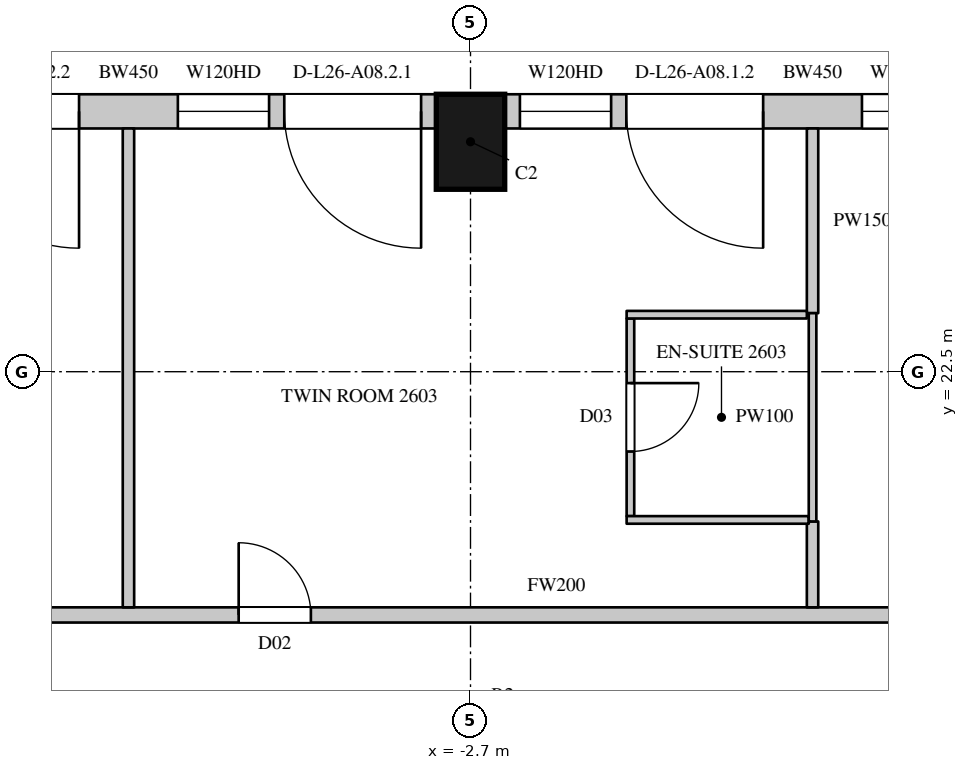
"""IFC4 building model, lengths in metres.
Left out: names, types, materials, properties, quantities, classifications, styles, units other than length and angle.
Written with IfcOpenShell. Run it as: python <this file> out.ifc"""

import sys

from ifc_helpers import new_model, si_unit, direction, frame, frame_2d, origin, origin_2d, place, context, subcontext, project, spatial, rectangle, extrude, element, fill, save


model = new_model("IFC4")
c1 = context("Model", 3, precision=1e-05, world=origin(), true_north=direction((0.0, 1.0)))
c2 = subcontext(c1, "Body", "Model", "MODEL_VIEW")
j1 = project(units=[si_unit("LENGTHUNIT", "METRE"), si_unit("PLANEANGLEUNIT", "RADIAN")], contexts=[c1])
p1 = place(None, origin())
s1 = spatial("IfcSite", under=j1, at=p1, CompositionType="ELEMENT")
p2 = place(p1, origin())
s2 = spatial("IfcBuilding", under=s1, at=p2, CompositionType="ELEMENT")
p3 = place(p2, frame((0.0, 0.0, 123.9)))
s3 = spatial("IfcBuildingStorey", under=s2, at=p3, CompositionType="ELEMENT", Elevation=123.9)
p4 = place(p3, frame((-2.7, 25.525, 0.0), z_axis=(0.0, 0.0, 1.0), x_axis=(-1.0, 0.0, 0.0)))
e1 = element("IfcColumn", 1, at=p4, inside=s3, PredefinedType="COLUMN", context=c2, shape_type="SweptSolid", body=[
    extrude(rectangle(XDim=0.9, YDim=1.25, at=origin_2d()), origin(), (0.0, 0.0, 1.0), 3.6),
])
p5 = place(p3, frame((5.85, 25.925, 0.0), z_axis=(0.0, 0.0, 1.0), x_axis=(-1.0, 0.0, 0.0)))
e2 = element("IfcWall", 2, at=p5, inside=s3, PredefinedType="SOLIDWALL", context=c2, shape_type="SweptSolid", body=[
    extrude(rectangle(XDim=8.1, YDim=0.45, at=frame_2d((4.05, 0.0))), origin(), (0.0, 0.0, 1.0), 3.3),
])
p6 = place(p5, frame((0.2, 0.0, 0.0)))
e3 = element("IfcOpeningElement", 3, at=p6, cuts=e2, PredefinedType="OPENING", context=c2, shape_type="SweptSolid", body=[
    extrude(rectangle(XDim=1.8, YDim=2.4, at=frame_2d((0.9, 1.2))), frame((0.0, 0.235, 0.0), z_axis=(0.0, -1.0, 0.0), x_axis=(1.0, 0.0, 0.0)), (0.0, 0.0, 1.0), 0.47),
])
p7 = place(p5, frame((2.2, 0.0, 1.05)))
e4 = element("IfcOpeningElement", 4, at=p7, cuts=e2, PredefinedType="OPENING", context=c2, shape_type="SweptSolid", body=[
    extrude(rectangle(XDim=1.2, YDim=2.0, at=frame_2d((0.6, 1.0))), frame((0.0, 0.235, 0.0), z_axis=(0.0, -1.0, 0.0), x_axis=(1.0, 0.0, 0.0)), (0.0, 0.0, 1.0), 0.47),
])
p8 = place(p5, frame((4.7, 0.0, 0.0)))
e5 = element("IfcOpeningElement", 5, at=p8, cuts=e2, PredefinedType="OPENING", context=c2, shape_type="SweptSolid", body=[
    extrude(rectangle(XDim=1.8, YDim=2.4, at=frame_2d((0.9, 1.2))), frame((0.0, 0.235, 0.0), z_axis=(0.0, -1.0, 0.0), x_axis=(1.0, 0.0, 0.0)), (0.0, 0.0, 1.0), 0.47),
])
p9 = place(p5, frame((6.7, 0.0, 1.05)))
e6 = element("IfcOpeningElement", 6, at=p9, cuts=e2, PredefinedType="OPENING", context=c2, shape_type="SweptSolid", body=[
    extrude(rectangle(XDim=1.2, YDim=2.0, at=frame_2d((0.6, 1.0))), frame((0.0, 0.235, 0.0), z_axis=(0.0, -1.0, 0.0), x_axis=(1.0, 0.0, 0.0)), (0.0, 0.0, 1.0), 0.47),
])
p10 = place(p3, frame((-3.15, 25.925, 0.0), z_axis=(0.0, 0.0, 1.0), x_axis=(-1.0, 0.0, 0.0)))
e7 = element("IfcWall", 7, at=p10, inside=s3, PredefinedType="SOLIDWALL", context=c2, shape_type="SweptSolid", body=[
    extrude(rectangle(XDim=8.1, YDim=0.45, at=frame_2d((4.05, 0.0))), origin(), (0.0, 0.0, 1.0), 3.3),
])
p11 = place(p10, frame((0.2, 0.0, 0.0)))
e8 = element("IfcOpeningElement", 8, at=p11, cuts=e7, PredefinedType="OPENING", context=c2, shape_type="SweptSolid", body=[
    extrude(rectangle(XDim=1.8, YDim=2.4, at=frame_2d((0.9, 1.2))), frame((0.0, 0.235, 0.0), z_axis=(0.0, -1.0, 0.0), x_axis=(1.0, 0.0, 0.0)), (0.0, 0.0, 1.0), 0.47),
])
p12 = place(p10, frame((2.2, 0.0, 1.05)))
e9 = element("IfcOpeningElement", 9, at=p12, cuts=e7, PredefinedType="OPENING", context=c2, shape_type="SweptSolid", body=[
    extrude(rectangle(XDim=1.2, YDim=2.0, at=frame_2d((0.6, 1.0))), frame((0.0, 0.235, 0.0), z_axis=(0.0, -1.0, 0.0), x_axis=(1.0, 0.0, 0.0)), (0.0, 0.0, 1.0), 0.47),
])
p13 = place(p10, frame((4.7, 0.0, 0.0)))
e10 = element("IfcOpeningElement", 10, at=p13, cuts=e7, PredefinedType="OPENING", context=c2, shape_type="SweptSolid", body=[
    extrude(rectangle(XDim=1.8, YDim=2.4, at=frame_2d((0.9, 1.2))), frame((0.0, 0.235, 0.0), z_axis=(0.0, -1.0, 0.0), x_axis=(1.0, 0.0, 0.0)), (0.0, 0.0, 1.0), 0.47),
])
p14 = place(p10, frame((6.7, 0.0, 1.05)))
e11 = element("IfcOpeningElement", 11, at=p14, cuts=e7, PredefinedType="OPENING", context=c2, shape_type="SweptSolid", body=[
    extrude(rectangle(XDim=1.2, YDim=2.0, at=frame_2d((0.6, 1.0))), frame((0.0, 0.235, 0.0), z_axis=(0.0, -1.0, 0.0), x_axis=(1.0, 0.0, 0.0)), (0.0, 0.0, 1.0), 0.47),
])
p15 = place(p3, frame((-20.8, 19.3, 0.0), z_axis=(0.0, 0.0, 1.0), x_axis=(1.0, 0.0, 0.0)))
e12 = element("IfcWall", 12, at=p15, inside=s3, PredefinedType="PARTITIONING", context=c2, shape_type="SweptSolid", body=[
    extrude(rectangle(XDim=38.464, YDim=0.2, at=frame_2d((19.232, 0.0))), origin(), (0.0, 0.0, 1.0), 3.3),
])
p16 = place(p15, frame((24.05, 0.0, 0.0)))
e13 = element("IfcOpeningElement", 13, at=p16, cuts=e12, PredefinedType="OPENING", context=c2, shape_type="SweptSolid", body=[
    extrude(rectangle(XDim=0.9, YDim=2.2, at=frame_2d((0.45, 1.1))), frame((0.0, 0.11, 0.0), z_axis=(0.0, -1.0, 0.0), x_axis=(1.0, 0.0, 0.0)), (0.0, 0.0, 1.0), 0.22),
])
p17 = place(p15, frame((11.2, 0.0, 0.0)))
e14 = element("IfcOpeningElement", 14, at=p17, cuts=e12, PredefinedType="OPENING", context=c2, shape_type="SweptSolid", body=[
    extrude(rectangle(XDim=0.95, YDim=2.2, at=frame_2d((0.475, 1.1))), frame((0.0, 0.11, 0.0), z_axis=(0.0, -1.0, 0.0), x_axis=(1.0, 0.0, 0.0)), (0.0, 0.0, 1.0), 0.22),
])
p18 = place(p15, frame((15.05, 0.0, 0.0)))
e15 = element("IfcOpeningElement", 15, at=p18, cuts=e12, PredefinedType="OPENING", context=c2, shape_type="SweptSolid", body=[
    extrude(rectangle(XDim=0.95, YDim=2.2, at=frame_2d((0.475, 1.1))), frame((0.0, 0.11, 0.0), z_axis=(0.0, -1.0, 0.0), x_axis=(1.0, 0.0, 0.0)), (0.0, 0.0, 1.0), 0.22),
])
p19 = place(p15, frame((32.0, 0.0, 0.0)))
e16 = element("IfcOpeningElement", 16, at=p19, cuts=e12, PredefinedType="OPENING", context=c2, shape_type="SweptSolid", body=[
    extrude(rectangle(XDim=0.95, YDim=2.2, at=frame_2d((0.475, 1.1))), frame((0.0, 0.11, 0.0), z_axis=(0.0, -1.0, 0.0), x_axis=(1.0, 0.0, 0.0)), (0.0, 0.0, 1.0), 0.22),
])
p20 = place(p3, frame((-7.2, 19.4, 0.0), z_axis=(0.0, 0.0, 1.0), x_axis=(0.0, 1.0, 0.0)))
e17 = element("IfcWall", 17, at=p20, inside=s3, PredefinedType="PARTITIONING", context=c2, shape_type="SweptSolid", body=[
    extrude(rectangle(XDim=6.3, YDim=0.15, at=frame_2d((3.15, 0.0))), origin(), (0.0, 0.0, 1.0), 2.65),
])
p21 = place(p3, frame((1.8, 19.4, 0.0), z_axis=(0.0, 0.0, 1.0), x_axis=(0.0, 1.0, 0.0)))
e18 = element("IfcWall", 18, at=p21, inside=s3, PredefinedType="PARTITIONING", context=c2, shape_type="SweptSolid", body=[
    extrude(rectangle(XDim=1.13, YDim=0.15, at=frame_2d((0.565, 0.0))), origin(), (0.0, 0.0, 1.0), 2.65),
])
p22 = place(p3, frame((1.8, 23.27, 0.0), z_axis=(0.0, 0.0, 1.0), x_axis=(0.0, 1.0, 0.0)))
e19 = element("IfcWall", 19, at=p22, inside=s3, PredefinedType="PARTITIONING", context=c2, shape_type="SweptSolid", body=[
    extrude(rectangle(XDim=2.43, YDim=0.15, at=frame_2d((1.215, 0.0))), origin(), (0.0, 0.0, 1.0), 2.65),
])
p23 = place(p3, frame((-0.596, 20.6, 0.0), z_axis=(0.0, 0.0, 1.0), x_axis=(0.0, 1.0, 0.0)))
e20 = element("IfcWall", 20, at=p23, inside=s3, PredefinedType="PARTITIONING", context=c2, shape_type="SweptSolid", body=[
    extrude(rectangle(XDim=2.6, YDim=0.1, at=frame_2d((1.3, 0.0))), origin(), (0.0, 0.0, 1.0), 3.3),
])
p24 = place(p23, frame((0.85, 0.0, 0.0)))
e21 = element("IfcOpeningElement", 21, at=p24, cuts=e20, PredefinedType="OPENING", context=c2, shape_type="SweptSolid", body=[
    extrude(rectangle(XDim=0.9, YDim=2.2, at=frame_2d((0.45, 1.1))), frame((0.0, 0.06, 0.0), z_axis=(0.0, -1.0, 0.0), x_axis=(1.0, 0.0, 0.0)), (0.0, 0.0, 1.0), 0.12),
])
p25 = place(p3, frame((-0.646, 20.55, 0.0), z_axis=(0.0, 0.0, 1.0), x_axis=(1.0, 0.0, 0.0)))
e22 = element("IfcWall", 22, at=p25, inside=s3, PredefinedType="PARTITIONING", context=c2, shape_type="SweptSolid", body=[
    extrude(rectangle(XDim=2.396, YDim=0.1, at=frame_2d((1.198, 0.0))), origin(), (0.0, 0.0, 1.0), 3.3),
])
p26 = place(p3, frame((-0.646, 23.25, 0.0), z_axis=(0.0, 0.0, 1.0), x_axis=(1.0, 0.0, 0.0)))
e23 = element("IfcWall", 23, at=p26, inside=s3, PredefinedType="PARTITIONING", context=c2, shape_type="SweptSolid", body=[
    extrude(rectangle(XDim=2.371, YDim=0.1, at=frame_2d((1.186, 0.0))), origin(), (0.0, 0.0, 1.0), 3.3),
])
p27 = place(p3, frame((1.8, 20.53, 0.0), z_axis=(0.0, 0.0, 1.0), x_axis=(0.0, 1.0, 0.0)))
e24 = element("IfcWall", 24, at=p27, inside=s3, PredefinedType="PARTITIONING", context=c2, shape_type="SweptSolid", body=[
    extrude(rectangle(XDim=2.74, YDim=0.1, at=frame_2d((1.37, 0.0))), origin(), (0.0, 0.0, 1.0), 2.65),
])
p28 = place(p7, origin())
e25 = element("IfcWindow", 25, at=p28, inside=s3, PartitioningType="SINGLE_PANEL", PredefinedType="WINDOW", context=c2, shape_type="SweptSolid", body=[
    extrude(rectangle(XDim=1.2, YDim=2.0, at=frame_2d((0.6, 1.0))), frame((0.0, 0.135, 0.0), z_axis=(0.0, -1.0, 0.0), x_axis=(1.0, 0.0, 0.0)), (0.0, 0.0, 1.0), 0.06),
])
fill(e4, e25)
p29 = place(p8, origin())
e26 = element("IfcDoor", 26, at=p29, inside=s3, OperationType="SLIDING_TO_LEFT", PredefinedType="DOOR", context=c2, shape_type="SweptSolid", body=[
    extrude(rectangle(XDim=1.8, YDim=2.4, at=frame_2d((0.9, 1.2))), frame((0.0, 0.13, 0.0), z_axis=(0.0, -1.0, 0.0), x_axis=(1.0, 0.0, 0.0)), (0.0, 0.0, 1.0), 0.05),
])
fill(e5, e26)
p30 = place(p9, origin())
e27 = element("IfcWindow", 27, at=p30, inside=s3, PartitioningType="SINGLE_PANEL", PredefinedType="WINDOW", context=c2, shape_type="SweptSolid", body=[
    extrude(rectangle(XDim=1.2, YDim=2.0, at=frame_2d((0.6, 1.0))), frame((0.0, 0.135, 0.0), z_axis=(0.0, -1.0, 0.0), x_axis=(1.0, 0.0, 0.0)), (0.0, 0.0, 1.0), 0.06),
])
fill(e6, e27)
p31 = place(p11, origin())
e28 = element("IfcDoor", 28, at=p31, inside=s3, OperationType="SLIDING_TO_LEFT", PredefinedType="DOOR", context=c2, shape_type="SweptSolid", body=[
    extrude(rectangle(XDim=1.8, YDim=2.4, at=frame_2d((0.9, 1.2))), frame((0.0, 0.13, 0.0), z_axis=(0.0, -1.0, 0.0), x_axis=(1.0, 0.0, 0.0)), (0.0, 0.0, 1.0), 0.05),
])
fill(e8, e28)
p32 = place(p12, origin())
e29 = element("IfcWindow", 29, at=p32, inside=s3, PartitioningType="SINGLE_PANEL", PredefinedType="WINDOW", context=c2, shape_type="SweptSolid", body=[
    extrude(rectangle(XDim=1.2, YDim=2.0, at=frame_2d((0.6, 1.0))), frame((0.0, 0.135, 0.0), z_axis=(0.0, -1.0, 0.0), x_axis=(1.0, 0.0, 0.0)), (0.0, 0.0, 1.0), 0.06),
])
fill(e9, e29)
p33 = place(p13, origin())
e30 = element("IfcDoor", 30, at=p33, inside=s3, OperationType="SLIDING_TO_LEFT", PredefinedType="DOOR", context=c2, shape_type="SweptSolid", body=[
    extrude(rectangle(XDim=1.8, YDim=2.4, at=frame_2d((0.9, 1.2))), frame((0.0, 0.13, 0.0), z_axis=(0.0, -1.0, 0.0), x_axis=(1.0, 0.0, 0.0)), (0.0, 0.0, 1.0), 0.05),
])
fill(e10, e30)
p34 = place(p18, origin())
e31 = element("IfcDoor", 31, at=p34, inside=s3, OperationType="SINGLE_SWING_LEFT", PredefinedType="DOOR", context=c2, shape_type="SweptSolid", body=[
    extrude(rectangle(XDim=0.95, YDim=2.2, at=frame_2d((0.475, 1.1))), frame((0.0, 0.025, 0.0), z_axis=(0.0, -1.0, 0.0), x_axis=(1.0, 0.0, 0.0)), (0.0, 0.0, 1.0), 0.05),
])
fill(e15, e31)
p35 = place(p24, origin())
e32 = element("IfcDoor", 32, at=p35, inside=s3, OperationType="SINGLE_SWING_LEFT", PredefinedType="DOOR", context=c2, shape_type="SweptSolid", body=[
    extrude(rectangle(XDim=0.9, YDim=2.2, at=frame_2d((0.45, 1.1))), frame((0.0, 0.025, 0.0), z_axis=(0.0, -1.0, 0.0), x_axis=(1.0, 0.0, 0.0)), (0.0, 0.0, 1.0), 0.05),
])
fill(e21, e32)
save(model, sys.argv[1])
